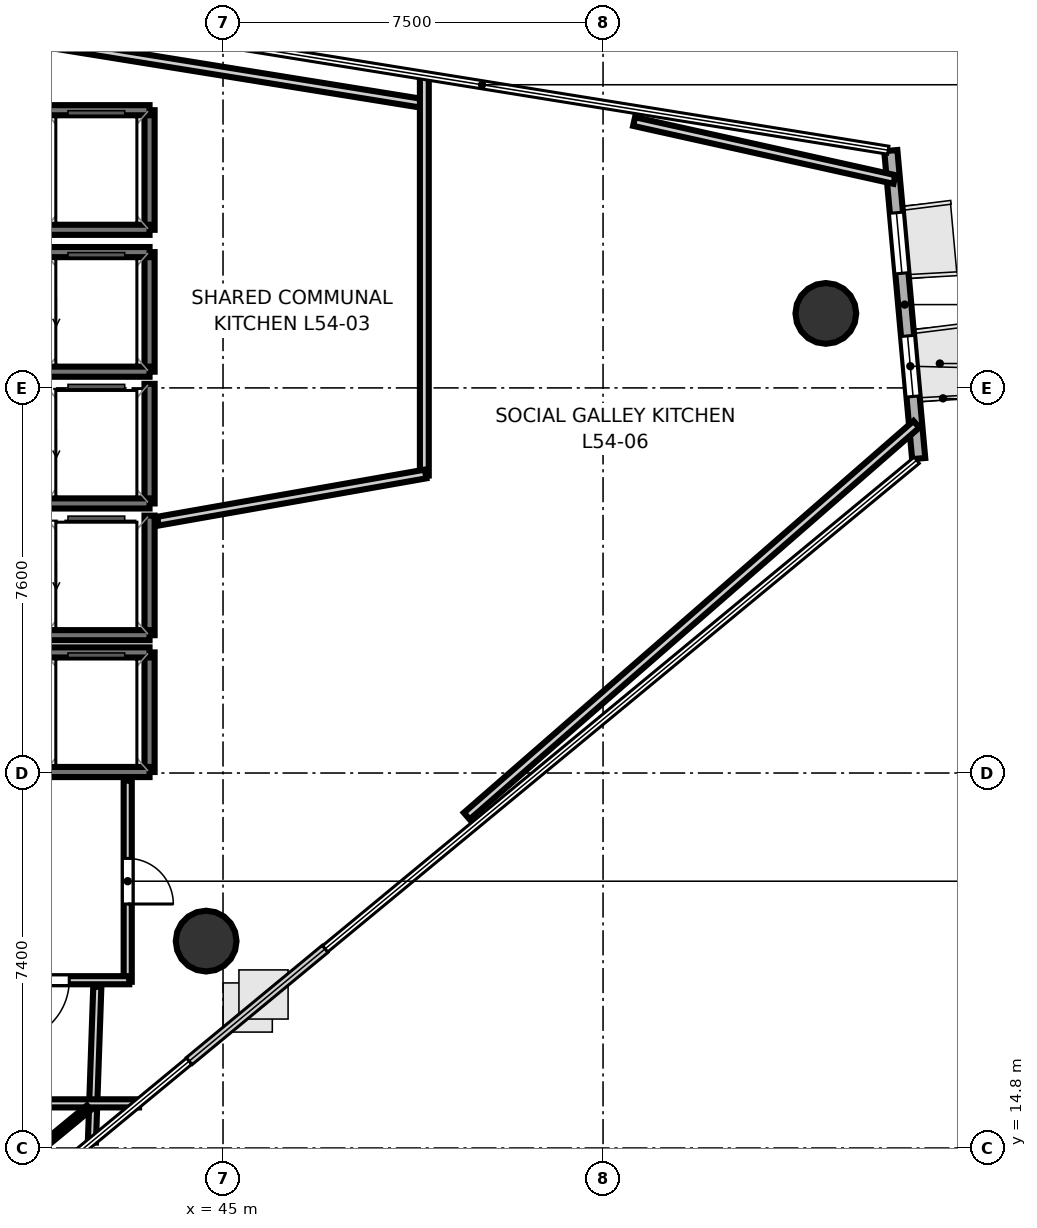
"""IFC4 building model, lengths in metres.
Left out: names, types, materials, properties, quantities, classifications, styles, units other than length and angle.
Written with IfcOpenShell. Run it as: python <this file> out.ifc"""

import sys

from ifc_helpers import new_model, si_unit, direction, frame, frame_2d, origin, origin_2d, place, context, subcontext, project, spatial, rectangle, hollow_circle, extrude, element, fill, save


model = new_model("IFC4")
c1 = context("Model", 3, precision=1e-05, world=origin(), true_north=direction((0.0, 1.0)))
c2 = subcontext(c1, "Body", "Model", "MODEL_VIEW")
j1 = project(units=[si_unit("LENGTHUNIT", "METRE"), si_unit("PLANEANGLEUNIT", "RADIAN")], contexts=[c1])
p1 = place(None, origin())
s1 = spatial("IfcSite", under=j1, at=p1, CompositionType="ELEMENT")
p2 = place(p1, origin())
s2 = spatial("IfcBuilding", under=s1, at=p2, CompositionType="ELEMENT")
p3 = place(p2, frame((0.0, 0.0, 211.4)))
s3 = spatial("IfcBuildingStorey", under=s2, at=p3, CompositionType="ELEMENT", Elevation=211.4)
for number, where, z_axis, x_axis in (
    (1, (56.897, 31.27, 0.0), (0.0, 0.0, 1.0), (1.0, 0.0, 0.0)),
    (2, (44.667, 18.883, 0.0), (0.0, 0.0, 1.0), (1.0, 0.0, 0.0)),
):
    element("IfcColumn", number, at=place(p3, frame(where, z_axis=z_axis, x_axis=x_axis)), inside=s3, PredefinedType="COLUMN", context=c2, shape_type="SweptSolid", body=[
        extrude(hollow_circle(Radius=0.6, WallThickness=0.03, at=origin_2d()), origin(), (0.0, 0.0, 1.0), 3.7),
    ])
p4 = place(p3, frame((58.729, 28.405, 0.0), z_axis=(0.0, 0.0, 1.0), x_axis=(-0.090211111085, 0.99592266539, 0.0)))
e3 = element("IfcWall", 3, at=p4, inside=s3, PredefinedType="SOLIDWALL", context=c2, shape_type="SweptSolid", body=[
    extrude(rectangle(XDim=6.103, YDim=0.26, at=frame_2d((3.051, 0.0))), origin(), (0.0, 0.0, 1.0), 3.52),
])
p5 = place(p4, frame((1.231, 0.0, 0.9)))
e4 = element("IfcOpeningElement", 4, at=p5, cuts=e3, PredefinedType="OPENING", context=c2, shape_type="SweptSolid", body=[
    extrude(rectangle(XDim=1.2, YDim=2.0, at=frame_2d((0.6, 1.0))), frame((0.0, 0.14, 0.0), z_axis=(0.0, -1.0, 0.0), x_axis=(1.0, 0.0, 0.0)), (0.0, 0.0, 1.0), 0.28),
])
p6 = place(p4, frame((3.672, 0.0, 0.9)))
e5 = element("IfcOpeningElement", 5, at=p6, cuts=e3, PredefinedType="OPENING", context=c2, shape_type="SweptSolid", body=[
    extrude(rectangle(XDim=1.2, YDim=2.0, at=frame_2d((0.6, 1.0))), frame((0.0, 0.14, 0.0), z_axis=(0.0, -1.0, 0.0), x_axis=(1.0, 0.0, 0.0)), (0.0, 0.0, 1.0), 0.28),
])
p7 = place(p3, frame((43.55, 30.12, 0.0), z_axis=(0.0, 0.0, 1.0), x_axis=(0.0, 1.0, 0.0)))
e6 = element("IfcWall", 6, at=p7, inside=s3, PredefinedType="SOLIDWALL", context=c2, shape_type="SweptSolid", body=[
    extrude(rectangle(XDim=2.36, YDim=0.2, at=frame_2d((1.18, 0.0))), origin(), (0.0, 0.0, 1.0), 3.52),
])
for number, where, z_axis, x_axis in (
    (7, (41.45, 32.48, 0.0), (0.0, 0.0, 1.0), (1.0, 0.0, 0.0)),
    (8, (41.45, 30.12, 0.0), (0.0, 0.0, 1.0), (1.0, 0.0, 0.0)),
):
    element("IfcWall", number, at=place(p3, frame(where, z_axis=z_axis, x_axis=x_axis)), inside=s3, PredefinedType="SOLIDWALL", context=c2, shape_type="SweptSolid", body=[
        extrude(rectangle(XDim=2.1, YDim=0.2, at=frame_2d((1.05, 0.0))), origin(), (0.0, 0.0, 1.0), 3.52),
    ])
p8 = place(p3, frame((43.55, 27.52, 0.0), z_axis=(0.0, 0.0, 1.0), x_axis=(0.0, 1.0, 0.0)))
e9 = element("IfcWall", 9, at=p8, inside=s3, PredefinedType="SOLIDWALL", context=c2, shape_type="SweptSolid", body=[
    extrude(rectangle(XDim=2.36, YDim=0.2, at=frame_2d((1.18, 0.0))), origin(), (0.0, 0.0, 1.0), 3.52),
])
p9 = place(p3, frame((41.45, 27.52, 0.0), z_axis=(0.0, 0.0, 1.0), x_axis=(1.0, 0.0, 0.0)))
e10 = element("IfcWall", 10, at=p9, inside=s3, PredefinedType="SOLIDWALL", context=c2, shape_type="SweptSolid", body=[
    extrude(rectangle(XDim=2.1, YDim=0.2, at=frame_2d((1.05, 0.0))), origin(), (0.0, 0.0, 1.0), 3.52),
])
p10 = place(p3, frame((43.55, 24.92, 0.0), z_axis=(0.0, 0.0, 1.0), x_axis=(0.0, 1.0, 0.0)))
e11 = element("IfcWall", 11, at=p10, inside=s3, PredefinedType="SOLIDWALL", context=c2, shape_type="SweptSolid", body=[
    extrude(rectangle(XDim=2.36, YDim=0.2, at=frame_2d((1.18, 0.0))), origin(), (0.0, 0.0, 1.0), 3.52),
])
p11 = place(p3, frame((41.45, 24.92, 0.0), z_axis=(0.0, 0.0, 1.0), x_axis=(1.0, 0.0, 0.0)))
e12 = element("IfcWall", 12, at=p11, inside=s3, PredefinedType="SOLIDWALL", context=c2, shape_type="SweptSolid", body=[
    extrude(rectangle(XDim=2.1, YDim=0.2, at=frame_2d((1.05, 0.0))), origin(), (0.0, 0.0, 1.0), 3.52),
])
p12 = place(p3, frame((43.55, 22.22, 0.0), z_axis=(0.0, 0.0, 1.0), x_axis=(0.0, 1.0, 0.0)))
e13 = element("IfcWall", 13, at=p12, inside=s3, PredefinedType="SOLIDWALL", context=c2, shape_type="SweptSolid", body=[
    extrude(rectangle(XDim=2.36, YDim=0.2, at=frame_2d((1.18, 0.0))), origin(), (0.0, 0.0, 1.0), 3.52),
])
for number, where, z_axis, x_axis in (
    (14, (41.45, 24.58, 0.0), (0.0, 0.0, 1.0), (1.0, 0.0, 0.0)),
    (15, (41.45, 22.22, 0.0), (0.0, 0.0, 1.0), (1.0, 0.0, 0.0)),
):
    element("IfcWall", number, at=place(p3, frame(where, z_axis=z_axis, x_axis=x_axis)), inside=s3, PredefinedType="SOLIDWALL", context=c2, shape_type="SweptSolid", body=[
        extrude(rectangle(XDim=2.1, YDim=0.2, at=frame_2d((1.05, 0.0))), origin(), (0.0, 0.0, 1.0), 3.52),
    ])
p13 = place(p3, frame((43.55, 32.92, 0.0), z_axis=(0.0, 0.0, 1.0), x_axis=(0.0, 1.0, 0.0)))
e16 = element("IfcWall", 16, at=p13, inside=s3, PredefinedType="SOLIDWALL", context=c2, shape_type="SweptSolid", body=[
    extrude(rectangle(XDim=2.36, YDim=0.2, at=frame_2d((1.18, 0.0))), origin(), (0.0, 0.0, 1.0), 3.52),
])
for number, where, z_axis, x_axis in (
    (17, (41.45, 35.28, 0.0), (0.0, 0.0, 1.0), (1.0, 0.0, 0.0)),
    (18, (41.45, 32.92, 0.0), (0.0, 0.0, 1.0), (1.0, 0.0, 0.0)),
):
    element("IfcWall", number, at=place(p3, frame(where, z_axis=z_axis, x_axis=x_axis)), inside=s3, PredefinedType="SOLIDWALL", context=c2, shape_type="SweptSolid", body=[
        extrude(rectangle(XDim=2.1, YDim=0.2, at=frame_2d((1.05, 0.0))), origin(), (0.0, 0.0, 1.0), 3.52),
    ])
p14 = place(p3, frame((43.119, 22.05, 0.0), z_axis=(0.0, 0.0, 1.0), x_axis=(0.0, -1.0, 0.0)))
e19 = element("IfcWall", 19, at=p14, inside=s3, PredefinedType="PARTITIONING", context=c2, shape_type="SweptSolid", body=[
    extrude(rectangle(XDim=3.97, YDim=0.16, at=frame_2d((1.985, 0.0))), origin(), (0.0, 0.0, 1.0), 2.84),
])
p15 = place(p14, frame((1.535, 0.0, 0.0)))
e20 = element("IfcOpeningElement", 20, at=p15, cuts=e19, PredefinedType="OPENING", context=c2, shape_type="SweptSolid", body=[
    extrude(rectangle(XDim=0.9, YDim=2.1, at=frame_2d((0.45, 1.05))), frame((0.0, 0.09, 0.0), z_axis=(0.0, -1.0, 0.0), x_axis=(1.0, 0.0, 0.0)), (0.0, 0.0, 1.0), 0.18),
])
p16 = place(p3, frame((43.15, 18.111, 0.0), z_axis=(0.0, 0.0, 1.0), x_axis=(-1.0, 0.0, 0.0)))
e21 = element("IfcWall", 21, at=p16, inside=s3, PredefinedType="PARTITIONING", context=c2, shape_type="SweptSolid", body=[
    extrude(rectangle(XDim=2.73, YDim=0.16, at=frame_2d((1.365, 0.0))), origin(), (0.0, 0.0, 1.0), 2.84),
])
p17 = place(p16, frame((1.185, 0.0, 0.0)))
e22 = element("IfcOpeningElement", 22, at=p17, cuts=e21, PredefinedType="OPENING", context=c2, shape_type="SweptSolid", body=[
    extrude(rectangle(XDim=1.2, YDim=2.15, at=frame_2d((0.6, 1.075))), frame((0.0, 0.09, 0.0), z_axis=(0.0, -1.0, 0.0), x_axis=(1.0, 0.0, 0.0)), (0.0, 0.0, 1.0), 0.18),
])
p18 = place(p3, frame((42.519, 17.981, 0.0), z_axis=(0.0, 0.0, 1.0), x_axis=(-0.034867127796, -0.999391956841, 0.0)))
e23 = element("IfcWall", 23, at=p18, inside=s3, PredefinedType="PARTITIONING", context=c2, shape_type="SweptSolid", body=[
    extrude(rectangle(XDim=3.074, YDim=0.16, at=frame_2d((1.537, 0.0))), origin(), (0.0, 0.0, 1.0), 2.84),
])
p19 = place(p3, frame((43.343, 15.681, 0.0), z_axis=(0.0, 0.0, 1.0), x_axis=(-1.0, 0.0, 0.0)))
e24 = element("IfcWall", 24, at=p19, inside=s3, PredefinedType="PARTITIONING", context=c2, shape_type="SweptSolid", body=[
    extrude(rectangle(XDim=14.943, YDim=0.16, at=frame_2d((7.472, 0.0))), origin(), (0.0, 0.0, 1.0), 2.84),
])
p20 = place(p19, frame((11.949, 0.0, 0.0)))
e25 = element("IfcOpeningElement", 25, at=p20, cuts=e24, PredefinedType="OPENING", context=c2, shape_type="SweptSolid", body=[
    extrude(rectangle(XDim=1.25, YDim=2.2, at=frame_2d((0.625, 1.1))), frame((0.0, 0.09, 0.0), z_axis=(0.0, -1.0, 0.0), x_axis=(1.0, 0.0, 0.0)), (0.0, 0.0, 1.0), 0.18),
])
p21 = place(p19, frame((5.292, 0.0, 0.0)))
e26 = element("IfcOpeningElement", 26, at=p21, cuts=e24, PredefinedType="OPENING", context=c2, shape_type="SweptSolid", body=[
    extrude(rectangle(XDim=1.25, YDim=2.2, at=frame_2d((0.625, 1.1))), frame((0.0, 0.09, 0.0), z_axis=(0.0, -1.0, 0.0), x_axis=(1.0, 0.0, 0.0)), (0.0, 0.0, 1.0), 0.18),
])
p22 = place(p3, frame((42.352, 15.594, 0.0), z_axis=(0.0, 0.0, 1.0), x_axis=(-0.77103880066, -0.636788165622, 0.0)))
e27 = element("IfcWall", 27, at=p22, inside=s3, PredefinedType="PARTITIONING", context=c2, shape_type="SweptSolid", body=[
    extrude(rectangle(XDim=7.643, YDim=0.12, at=frame_2d((3.822, 0.0))), origin(), (0.0, 0.0, 1.0), 2.84),
])
p23 = place(p3, frame((37.225, 37.301, 0.0), z_axis=(0.0, 0.0, 1.0), x_axis=(0.987268097612, -0.159065091827, 0.0)))
e28 = element("IfcWall", 28, at=p23, inside=s3, PredefinedType="PLUMBINGWALL", context=c2, shape_type="SweptSolid", body=[
    extrude(rectangle(XDim=11.926, YDim=0.175, at=frame_2d((5.963, 0.0))), origin(), (0.0, 0.0, 1.0), 2.84),
])
p24 = place(p3, frame((48.973, 35.986, 0.0), z_axis=(0.0, 0.0, 1.0), x_axis=(0.0, -1.0, 0.0)))
e29 = element("IfcWall", 29, at=p24, inside=s3, PredefinedType="PLUMBINGWALL", context=c2, shape_type="SweptSolid", body=[
    extrude(rectangle(XDim=7.915, YDim=0.175, at=frame_2d((3.958, 0.0))), origin(), (0.0, 0.0, 1.0), 2.84),
])
p25 = place(p3, frame((48.999, 28.102, 0.0), z_axis=(0.0, 0.0, 1.0), x_axis=(-0.984809658173, -0.173637372619, 0.0)))
e30 = element("IfcWall", 30, at=p25, inside=s3, PredefinedType="PLUMBINGWALL", context=c2, shape_type="SweptSolid", body=[
    extrude(rectangle(XDim=5.365, YDim=0.175, at=frame_2d((2.683, 0.0))), origin(), (0.0, 0.0, 1.0), 2.84),
])
p26 = place(p3, frame((53.112, 35.056, 0.0), z_axis=(0.0, 0.0, 1.0), x_axis=(0.97614010372, -0.217141654019, 0.0)))
e31 = element("IfcWall", 31, at=p26, inside=s3, PredefinedType="PLUMBINGWALL", context=c2, shape_type="SweptSolid", body=[
    extrude(rectangle(XDim=5.263, YDim=0.175, at=frame_2d((2.631, 0.0))), origin(), (0.0, 0.0, 1.0), 2.84),
])
p27 = place(p3, frame((58.685, 29.083, 0.0), z_axis=(0.0, 0.0, 1.0), x_axis=(-0.753948689731, -0.656933309593, 0.0)))
e32 = element("IfcWall", 32, at=p27, inside=s3, PredefinedType="PLUMBINGWALL", context=c2, shape_type="SweptSolid", body=[
    extrude(rectangle(XDim=11.77, YDim=0.175, at=frame_2d((5.885, 0.0))), origin(), (0.0, 0.0, 1.0), 2.84),
])
p28 = place(p17, origin())
e33 = element("IfcDoor", 33, at=p28, inside=s3, OperationType="SINGLE_SWING_RIGHT", PredefinedType="DOOR", context=c2, shape_type="SweptSolid", body=[
    extrude(rectangle(XDim=1.2, YDim=2.15, at=frame_2d((0.6, 1.075))), frame((0.0, 0.025, 0.0), z_axis=(0.0, -1.0, 0.0), x_axis=(1.0, 0.0, 0.0)), (0.0, 0.0, 1.0), 0.05),
])
fill(e22, e33)
p29 = place(p15, origin())
e34 = element("IfcDoor", 34, at=p29, inside=s3, OperationType="SINGLE_SWING_RIGHT", PredefinedType="DOOR", context=c2, shape_type="SweptSolid", body=[
    extrude(rectangle(XDim=0.9, YDim=2.1, at=frame_2d((0.45, 1.05))), frame((0.0, 0.025, 0.0), z_axis=(0.0, -1.0, 0.0), x_axis=(1.0, 0.0, 0.0)), (0.0, 0.0, 1.0), 0.05),
])
fill(e20, e34)
p30 = place(p5, origin())
e35 = element("IfcWindow", 35, at=p30, inside=s3, PartitioningType="SINGLE_PANEL", PredefinedType="WINDOW", context=c2, shape_type="SweptSolid", body=[
    extrude(rectangle(XDim=1.2, YDim=2.0, at=frame_2d((0.6, 1.0))), frame((0.0, 0.03, 0.0), z_axis=(0.0, -1.0, 0.0), x_axis=(1.0, 0.0, 0.0)), (0.0, 0.0, 1.0), 0.06),
])
fill(e4, e35)
p31 = place(p6, origin())
e36 = element("IfcWindow", 36, at=p31, inside=s3, PartitioningType="SINGLE_PANEL", PredefinedType="WINDOW", context=c2, shape_type="SweptSolid", body=[
    extrude(rectangle(XDim=1.2, YDim=2.0, at=frame_2d((0.6, 1.0))), frame((0.0, 0.03, 0.0), z_axis=(0.0, -1.0, 0.0), x_axis=(1.0, 0.0, 0.0)), (0.0, 0.0, 1.0), 0.06),
])
fill(e5, e36)
save(model, sys.argv[1])
